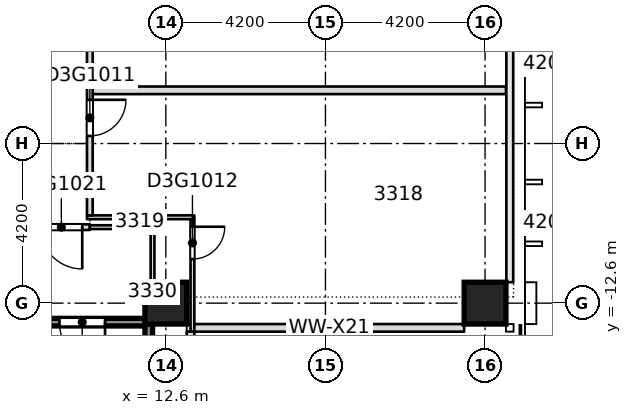
"""IFC4 building model, lengths in metres.
Left out: names, types, materials, properties, quantities, classifications, styles, units other than length and angle.
Written with IfcOpenShell. Run it as: python <this file> out.ifc"""

import sys

from ifc_helpers import new_model, si_unit, direction, frame, frame_2d, origin, origin_2d, place, context, subcontext, project, spatial, rectangle, extrude, element, fill, save


model = new_model("IFC4")
c1 = context("Model", 3, precision=1e-05, world=origin(), true_north=direction((0.0, 1.0)))
c2 = subcontext(c1, "Body", "Model", "MODEL_VIEW")
j1 = project(units=[si_unit("LENGTHUNIT", "METRE"), si_unit("PLANEANGLEUNIT", "RADIAN")], contexts=[c1])
p1 = place(None, origin())
s1 = spatial("IfcSite", under=j1, at=p1, CompositionType="ELEMENT")
p2 = place(p1, origin())
s2 = spatial("IfcBuilding", under=s1, at=p2, CompositionType="ELEMENT")
p3 = place(p2, frame((0.0, 0.0, 133.1)))
s3 = spatial("IfcBuildingStorey", under=s2, at=p3, CompositionType="ELEMENT", Elevation=133.1)
for number, where, z_axis, x_axis in (
    (1, (12.6, -12.6, -0.4), (0.0, 0.0, 1.0), (1.0, 0.0, 0.0)),
    (2, (21.0, -12.6, -0.4), (0.0, 0.0, 1.0), (1.0, 0.0, 0.0)),
):
    element("IfcColumn", number, at=place(p3, frame(where, z_axis=z_axis, x_axis=x_axis)), inside=s3, PredefinedType="COLUMN", context=c2, shape_type="SweptSolid", body=[
        extrude(rectangle(XDim=1.1, YDim=1.1, at=origin_2d()), origin(), (0.0, 0.0, 1.0), 3.45),
    ])
p4 = place(p3, frame((8.65, -13.1, 0.0), z_axis=(0.0, 0.0, 1.0), x_axis=(1.0, 0.0, 0.0)))
e3 = element("IfcWall", 3, at=p4, inside=s3, PredefinedType="SOLIDWALL", context=c2, shape_type="SweptSolid", body=[
    extrude(rectangle(XDim=3.5, YDim=0.2, at=frame_2d((1.75, 0.0))), origin(), (0.0, 0.0, 1.0), 3.05),
])
p5 = place(p4, frame((1.15, 0.0, 0.0)))
e4 = element("IfcOpeningElement", 4, at=p5, cuts=e3, PredefinedType="OPENING", context=c2, shape_type="SweptSolid", body=[
    extrude(rectangle(XDim=1.2, YDim=2.1, at=frame_2d((0.6, 1.05))), frame((0.0, 0.11, 0.0), z_axis=(0.0, -1.0, 0.0), x_axis=(1.0, 0.0, 0.0)), (0.0, 0.0, 1.0), 0.22),
])
p6 = place(p3, frame((4.5, -10.6, 0.0), z_axis=(0.0, 0.0, 1.0), x_axis=(1.0, 0.0, 0.0)))
e5 = element("IfcWall", 5, at=p6, inside=s3, PredefinedType="PARTITIONING", context=c2, shape_type="SweptSolid", body=[
    extrude(rectangle(XDim=6.1, YDim=0.15, at=frame_2d((3.05, 0.0))), origin(), (0.0, 0.0, 1.0), 3.05),
])
p7 = place(p6, frame((1.575, 0.0, 0.0)))
e6 = element("IfcOpeningElement", 6, at=p7, cuts=e5, PredefinedType="OPENING", context=c2, shape_type="SweptSolid", body=[
    extrude(rectangle(XDim=0.95, YDim=2.1, at=frame_2d((0.475, 1.05))), frame((0.0, 0.085, 0.0), z_axis=(0.0, -1.0, 0.0), x_axis=(1.0, 0.0, 0.0)), (0.0, 0.0, 1.0), 0.17),
])
p8 = place(p6, frame((4.8, 0.0, 0.0)))
e7 = element("IfcOpeningElement", 7, at=p8, cuts=e5, PredefinedType="OPENING", context=c2, shape_type="SweptSolid", body=[
    extrude(rectangle(XDim=1.1, YDim=2.1, at=frame_2d((0.55, 1.05))), frame((0.0, 0.085, 0.0), z_axis=(0.0, -1.0, 0.0), x_axis=(1.0, 0.0, 0.0)), (0.0, 0.0, 1.0), 0.17),
])
p9 = place(p3, frame((10.6, -10.6, 0.0), z_axis=(0.0, 0.0, 1.0), x_axis=(1.0, 0.0, 0.0)))
e8 = element("IfcWall", 8, at=p9, inside=s3, PredefinedType="PARTITIONING", context=c2, shape_type="SweptSolid", body=[
    extrude(rectangle(XDim=1.7, YDim=0.1, at=frame_2d((0.85, 0.0))), origin(), (0.0, 0.0, 1.0), 3.05),
])
p10 = place(p3, frame((10.525, -10.34, 0.0), z_axis=(0.0, 0.0, 1.0), x_axis=(1.0, 0.0, 0.0)))
e9 = element("IfcWall", 9, at=p10, inside=s3, PredefinedType="PARTITIONING", context=c2, shape_type="SweptSolid", body=[
    extrude(rectangle(XDim=2.825, YDim=0.1, at=frame_2d((1.413, 0.0))), origin(), (0.0, 0.0, 1.0), 3.05),
])
p11 = place(p3, frame((10.675, -7.0, 0.0), z_axis=(0.0, 0.0, 1.0), x_axis=(1.0, 0.0, 0.0)))
e10 = element("IfcWall", 10, at=p11, inside=s3, PredefinedType="PARTITIONING", context=c2, shape_type="SweptSolid", body=[
    extrude(rectangle(XDim=10.875, YDim=0.2, at=frame_2d((5.438, 0.0))), origin(), (0.0, 0.0, 1.0), 3.05),
])
p12 = place(p3, frame((10.6, -10.29, 0.0), z_axis=(0.0, 0.0, 1.0), x_axis=(0.0, 1.0, 0.0)))
e11 = element("IfcWall", 11, at=p12, inside=s3, PredefinedType="PARTITIONING", context=c2, shape_type="SweptSolid", body=[
    extrude(rectangle(XDim=13.64, YDim=0.15, at=frame_2d((6.82, 0.0))), origin(), (0.0, 0.0, 1.0), 3.05),
])
p13 = place(p12, frame((2.09, 0.0, 0.0)))
e12 = element("IfcOpeningElement", 12, at=p13, cuts=e11, PredefinedType="OPENING", context=c2, shape_type="SweptSolid", body=[
    extrude(rectangle(XDim=0.95, YDim=2.1, at=frame_2d((0.475, 1.05))), frame((0.0, 0.085, 0.0), z_axis=(0.0, -1.0, 0.0), x_axis=(1.0, 0.0, 0.0)), (0.0, 0.0, 1.0), 0.17),
])
p14 = place(p12, frame((9.74, 0.0, 0.0)))
e13 = element("IfcOpeningElement", 13, at=p14, cuts=e11, PredefinedType="OPENING", context=c2, shape_type="SweptSolid", body=[
    extrude(rectangle(XDim=1.1, YDim=2.1, at=frame_2d((0.55, 1.05))), frame((0.0, 0.085, 0.0), z_axis=(0.0, -1.0, 0.0), x_axis=(1.0, 0.0, 0.0)), (0.0, 0.0, 1.0), 0.17),
])
p15 = place(p12, frame((4.59, 0.0, 0.0)))
e14 = element("IfcOpeningElement", 14, at=p15, cuts=e11, PredefinedType="OPENING", context=c2, shape_type="SweptSolid", body=[
    extrude(rectangle(XDim=1.0, YDim=2.1, at=frame_2d((0.5, 1.05))), frame((0.0, 0.085, 0.0), z_axis=(0.0, -1.0, 0.0), x_axis=(1.0, 0.0, 0.0)), (0.0, 0.0, 1.0), 0.17),
])
p16 = place(p12, frame((11.99, 0.0, 0.0)))
e15 = element("IfcOpeningElement", 15, at=p16, cuts=e11, PredefinedType="OPENING", context=c2, shape_type="SweptSolid", body=[
    extrude(rectangle(XDim=1.0, YDim=2.1, at=frame_2d((0.5, 1.05))), frame((0.0, 0.085, 0.0), z_axis=(0.0, -1.0, 0.0), x_axis=(1.0, 0.0, 0.0)), (0.0, 0.0, 1.0), 0.17),
])
p17 = place(p3, frame((12.25, -12.44, 0.0), z_axis=(0.0, 0.0, 1.0), x_axis=(0.0, 1.0, 0.0)))
e16 = element("IfcWall", 16, at=p17, inside=s3, PredefinedType="PARTITIONING", context=c2, shape_type="SweptSolid", body=[
    extrude(rectangle(XDim=1.79, YDim=0.1, at=frame_2d((0.895, 0.0))), origin(), (0.0, 0.0, 1.0), 3.05),
])
p18 = place(p3, frame((13.3, -13.35, 0.0), z_axis=(0.0, 0.0, 1.0), x_axis=(0.0, 1.0, 0.0)))
e17 = element("IfcWall", 17, at=p18, inside=s3, PredefinedType="PARTITIONING", context=c2, shape_type="SweptSolid", body=[
    extrude(rectangle(XDim=2.96, YDim=0.1, at=frame_2d((1.48, 0.0))), origin(), (0.0, 0.0, 1.0), 3.05),
])
p19 = place(p18, frame((1.91, 0.0, 0.0)))
e18 = element("IfcOpeningElement", 18, at=p19, cuts=e17, PredefinedType="OPENING", context=c2, shape_type="SweptSolid", body=[
    extrude(rectangle(XDim=0.85, YDim=2.1, at=frame_2d((0.425, 1.05))), frame((0.0, 0.06, 0.0), z_axis=(0.0, -1.0, 0.0), x_axis=(1.0, 0.0, 0.0)), (0.0, 0.0, 1.0), 0.12),
])
p20 = place(p3, frame((13.25, -20.45, 0.0), z_axis=(0.0, 0.0, 1.0), x_axis=(0.0, 1.0, 0.0)))
e19 = element("IfcWall", 19, at=p20, inside=s3, PredefinedType="STANDARD", context=c2, shape_type="SweptSolid", body=[
    extrude(rectangle(XDim=7.1, YDim=0.2, at=frame_2d((3.55, 0.0))), origin(), (0.0, 0.0, 1.0), 3.05),
])
p21 = place(p20, frame((0.925, 0.0, 0.2)))
e20 = element("IfcOpeningElement", 20, at=p21, cuts=e19, PredefinedType="OPENING", context=c2, shape_type="SweptSolid", body=[
    extrude(rectangle(XDim=1.8, YDim=2.65, at=frame_2d((0.9, 1.325))), frame((0.0, 0.11, 0.0), z_axis=(0.0, -1.0, 0.0), x_axis=(1.0, 0.0, 0.0)), (0.0, 0.0, 1.0), 0.22),
])
p22 = place(p20, frame((4.475, 0.0, 0.2)))
e21 = element("IfcOpeningElement", 21, at=p22, cuts=e19, PredefinedType="OPENING", context=c2, shape_type="SweptSolid", body=[
    extrude(rectangle(XDim=1.8, YDim=2.65, at=frame_2d((0.9, 1.325))), frame((0.0, 0.11, 0.0), z_axis=(0.0, -1.0, 0.0), x_axis=(1.0, 0.0, 0.0)), (0.0, 0.0, 1.0), 0.22),
])
p23 = place(p3, frame((13.35, -13.25, 0.0), z_axis=(0.0, 0.0, 1.0), x_axis=(1.0, 0.0, 0.0)))
e22 = element("IfcWall", 22, at=p23, inside=s3, PredefinedType="STANDARD", context=c2, shape_type="SweptSolid", body=[
    extrude(rectangle(XDim=7.1, YDim=0.2, at=frame_2d((3.55, 0.0))), origin(), (0.0, 0.0, 1.0), 3.05),
])
p24 = place(p3, frame((12.15, -20.45, 0.0), z_axis=(0.0, 0.0, 1.0), x_axis=(0.0, 1.0, 0.0)))
e23 = element("IfcWall", 23, at=p24, inside=s3, PredefinedType="SOLIDWALL", context=c2, shape_type="SweptSolid", body=[
    extrude(rectangle(XDim=7.3, YDim=0.2, at=frame_2d((3.65, 0.0))), origin(), (0.0, 0.0, 1.0), 3.05),
])
p25 = place(p13, origin())
e24 = element("IfcDoor", 24, at=p25, inside=s3, OperationType="SINGLE_SWING_LEFT", PredefinedType="DOOR", context=c2, shape_type="SweptSolid", body=[
    extrude(rectangle(XDim=0.95, YDim=2.1, at=frame_2d((0.475, 1.05))), frame((0.0, 0.025, 0.0), z_axis=(0.0, -1.0, 0.0), x_axis=(1.0, 0.0, 0.0)), (0.0, 0.0, 1.0), 0.05),
])
fill(e12, e24)
p26 = place(p19, origin())
e25 = element("IfcDoor", 25, at=p26, inside=s3, OperationType="SINGLE_SWING_LEFT", PredefinedType="DOOR", context=c2, shape_type="SweptSolid", body=[
    extrude(rectangle(XDim=0.85, YDim=2.1, at=frame_2d((0.425, 1.05))), frame((0.0, 0.025, 0.0), z_axis=(0.0, -1.0, 0.0), x_axis=(1.0, 0.0, 0.0)), (0.0, 0.0, 1.0), 0.05),
])
fill(e18, e25)
p27 = place(p8, origin())
e26 = element("IfcDoor", 26, at=p27, inside=s3, OperationType="SINGLE_SWING_RIGHT", PredefinedType="DOOR", context=c2, shape_type="SweptSolid", body=[
    extrude(rectangle(XDim=1.1, YDim=2.1, at=frame_2d((0.55, 1.05))), frame((0.0, 0.025, 0.0), z_axis=(0.0, -1.0, 0.0), x_axis=(1.0, 0.0, 0.0)), (0.0, 0.0, 1.0), 0.05),
])
fill(e7, e26)
p28 = place(p5, origin())
e27 = element("IfcDoor", 27, at=p28, inside=s3, OperationType="SINGLE_SWING_RIGHT", PredefinedType="DOOR", context=c2, shape_type="SweptSolid", body=[
    extrude(rectangle(XDim=1.2, YDim=2.1, at=frame_2d((0.6, 1.05))), frame((0.0, 0.025, 0.0), z_axis=(0.0, -1.0, 0.0), x_axis=(1.0, 0.0, 0.0)), (0.0, 0.0, 1.0), 0.05),
])
fill(e4, e27)
save(model, sys.argv[1])
